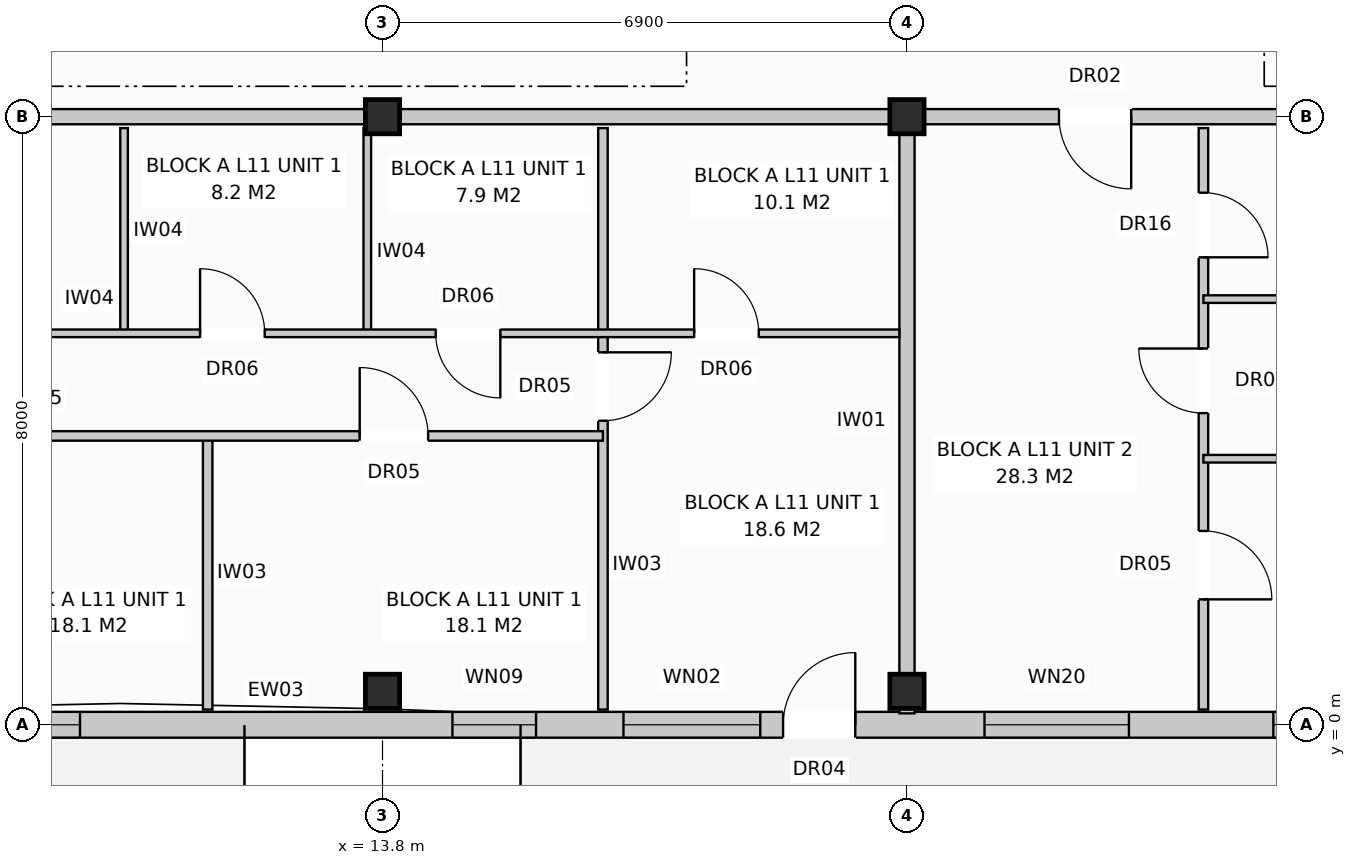
"""IFC4 building model, lengths in metres.
Left out: names, types, materials, properties, quantities, classifications, styles, units other than length and angle.
Written with IfcOpenShell. Run it as: python <this file> out.ifc"""

import sys

from ifc_helpers import new_model, si_unit, direction, frame, frame_2d, origin, origin_with_axes, origin_2d, place, context, subcontext, project, spatial, rectangle, extrude, element, fill, save


model = new_model("IFC4")
c1 = context("Model", 3, precision=1e-05, world=origin(), true_north=direction((0.0, 1.0)))
c2 = subcontext(c1, "Body", "Model", "MODEL_VIEW")
j1 = project(units=[si_unit("LENGTHUNIT", "METRE"), si_unit("PLANEANGLEUNIT", "RADIAN")], contexts=[c1])
p1 = place(None, origin())
s1 = spatial("IfcSite", under=j1, at=p1, CompositionType="ELEMENT")
p2 = place(p1, origin())
s2 = spatial("IfcBuilding", under=s1, at=p2, CompositionType="ELEMENT")
p3 = place(p2, frame((0.0, 0.0, 36.8)))
s3 = spatial("IfcBuildingStorey", under=s2, at=p3, CompositionType="ELEMENT", Elevation=36.8)
for number, where, z_axis, x_axis in (
    (1, (13.8, 0.44, 0.0), (0.0, 0.0, 1.0), (1.0, 0.0, 0.0)),
    (2, (13.8, 8.0, 0.0), (0.0, 0.0, 1.0), (1.0, 0.0, 0.0)),
    (3, (20.7, 0.44, 0.0), (0.0, 0.0, 1.0), (1.0, 0.0, 0.0)),
    (4, (20.7, 8.0, 0.0), (0.0, 0.0, 1.0), (1.0, 0.0, 0.0)),
):
    element("IfcColumn", number, at=place(p3, frame(where, z_axis=z_axis, x_axis=x_axis)), inside=s3, PredefinedType="COLUMN", context=c2, shape_type="SweptSolid", body=[
        extrude(rectangle(XDim=0.45, YDim=0.45, at=origin_2d()), origin(), (0.0, 0.0, 1.0), 3.2),
    ])
p4 = place(p3, frame((0.16, 0.0, 0.0), z_axis=(0.0, 0.0, 1.0), x_axis=(1.0, 0.0, 0.0)))
e5 = element("IfcWall", 5, at=p4, inside=s3, PredefinedType="STANDARD", context=c2, shape_type="SweptSolid", body=[
    extrude(rectangle(XDim=41.08, YDim=0.34, at=frame_2d((20.54, 0.0))), origin(), (0.0, 0.0, 1.0), 2.97),
])
p5 = place(p4, frame((4.926, 0.0, 0.0)))
e6 = element("IfcOpeningElement", 6, at=p5, cuts=e5, PredefinedType="OPENING", context=c2, shape_type="SweptSolid", body=[
    extrude(rectangle(XDim=0.95, YDim=2.1, at=frame_2d((0.475, 1.05))), frame((0.0, 0.182, 0.0), z_axis=(0.0, -1.0, 0.0), x_axis=(1.0, 0.0, 0.0)), (0.0, 0.0, 1.0), 0.364),
])
p6 = place(p4, frame((18.91, 0.0, 0.0)))
e7 = element("IfcOpeningElement", 7, at=p6, cuts=e5, PredefinedType="OPENING", context=c2, shape_type="SweptSolid", body=[
    extrude(rectangle(XDim=0.95, YDim=2.1, at=frame_2d((0.475, 1.05))), frame((0.0, 0.182, 0.0), z_axis=(0.0, -1.0, 0.0), x_axis=(1.0, 0.0, 0.0)), (0.0, 0.0, 1.0), 0.364),
])
p7 = place(p4, frame((30.426, 0.0, 0.0)))
e8 = element("IfcOpeningElement", 8, at=p7, cuts=e5, PredefinedType="OPENING", context=c2, shape_type="SweptSolid", body=[
    extrude(rectangle(XDim=0.95, YDim=2.1, at=frame_2d((0.475, 1.05))), frame((0.0, 0.182, 0.0), z_axis=(0.0, -1.0, 0.0), x_axis=(1.0, 0.0, 0.0)), (0.0, 0.0, 1.0), 0.364),
])
p8 = place(p4, frame((2.46, 0.0, 0.72)))
e9 = element("IfcOpeningElement", 9, at=p8, cuts=e5, PredefinedType="OPENING", context=c2, shape_type="SweptSolid", body=[
    extrude(rectangle(XDim=1.1, YDim=1.5, at=frame_2d((0.55, 0.75))), frame((0.0, 0.182, 0.0), z_axis=(0.0, -1.0, 0.0), x_axis=(1.0, 0.0, 0.0)), (0.0, 0.0, 1.0), 0.364),
])
p9 = place(p4, frame((7.76, 0.0, 0.72)))
e10 = element("IfcOpeningElement", 10, at=p9, cuts=e5, PredefinedType="OPENING", context=c2, shape_type="SweptSolid", body=[
    extrude(rectangle(XDim=1.9, YDim=1.85, at=frame_2d((0.95, 0.925))), frame((0.0, 0.182, 0.0), z_axis=(0.0, -1.0, 0.0), x_axis=(1.0, 0.0, 0.0)), (0.0, 0.0, 1.0), 0.364),
])
p10 = place(p4, frame((14.56, 0.0, 0.72)))
e11 = element("IfcOpeningElement", 11, at=p10, cuts=e5, PredefinedType="OPENING", context=c2, shape_type="SweptSolid", body=[
    extrude(rectangle(XDim=1.1, YDim=1.5, at=frame_2d((0.55, 0.75))), frame((0.0, 0.182, 0.0), z_axis=(0.0, -1.0, 0.0), x_axis=(1.0, 0.0, 0.0)), (0.0, 0.0, 1.0), 0.364),
])
p11 = place(p4, frame((16.81, 0.0, 0.8)))
e12 = element("IfcOpeningElement", 12, at=p11, cuts=e5, PredefinedType="OPENING", context=c2, shape_type="SweptSolid", body=[
    extrude(rectangle(XDim=1.8, YDim=1.7, at=frame_2d((0.9, 0.85))), frame((0.0, 0.182, 0.0), z_axis=(0.0, -1.0, 0.0), x_axis=(1.0, 0.0, 0.0)), (0.0, 0.0, 1.0), 0.364),
])
p12 = place(p4, frame((21.56, 0.0, 0.72)))
e13 = element("IfcOpeningElement", 13, at=p12, cuts=e5, PredefinedType="OPENING", context=c2, shape_type="SweptSolid", body=[
    extrude(rectangle(XDim=1.9, YDim=1.85, at=frame_2d((0.95, 0.925))), frame((0.0, 0.182, 0.0), z_axis=(0.0, -1.0, 0.0), x_axis=(1.0, 0.0, 0.0)), (0.0, 0.0, 1.0), 0.364),
])
p13 = place(p4, frame((25.36, 0.0, 0.72)))
e14 = element("IfcOpeningElement", 14, at=p13, cuts=e5, PredefinedType="OPENING", context=c2, shape_type="SweptSolid", body=[
    extrude(rectangle(XDim=1.1, YDim=1.5, at=frame_2d((0.55, 0.75))), frame((0.0, 0.182, 0.0), z_axis=(0.0, -1.0, 0.0), x_axis=(1.0, 0.0, 0.0)), (0.0, 0.0, 1.0), 0.364),
])
p14 = place(p4, frame((28.66, 0.0, 0.72)))
e15 = element("IfcOpeningElement", 15, at=p14, cuts=e5, PredefinedType="OPENING", context=c2, shape_type="SweptSolid", body=[
    extrude(rectangle(XDim=1.1, YDim=1.5, at=frame_2d((0.55, 0.75))), frame((0.0, 0.182, 0.0), z_axis=(0.0, -1.0, 0.0), x_axis=(1.0, 0.0, 0.0)), (0.0, 0.0, 1.0), 0.364),
])
p15 = place(p4, frame((31.96, 0.0, 0.72)))
e16 = element("IfcOpeningElement", 16, at=p15, cuts=e5, PredefinedType="OPENING", context=c2, shape_type="SweptSolid", body=[
    extrude(rectangle(XDim=1.9, YDim=1.85, at=frame_2d((0.95, 0.925))), frame((0.0, 0.182, 0.0), z_axis=(0.0, -1.0, 0.0), x_axis=(1.0, 0.0, 0.0)), (0.0, 0.0, 1.0), 0.364),
])
p16 = place(p4, frame((38.06, 0.0, 0.72)))
e17 = element("IfcOpeningElement", 17, at=p16, cuts=e5, PredefinedType="OPENING", context=c2, shape_type="SweptSolid", body=[
    extrude(rectangle(XDim=1.1, YDim=1.5, at=frame_2d((0.55, 0.75))), frame((0.0, 0.182, 0.0), z_axis=(0.0, -1.0, 0.0), x_axis=(1.0, 0.0, 0.0)), (0.0, 0.0, 1.0), 0.364),
])
p17 = place(p3, frame((20.7, 7.85, 0.0), z_axis=(0.0, 0.0, 1.0), x_axis=(0.0, -1.0, 0.0)))
e18 = element("IfcWall", 18, at=p17, inside=s3, PredefinedType="PARTITIONING", context=c2, shape_type="SweptSolid", body=[
    extrude(rectangle(XDim=7.7, YDim=0.2, at=frame_2d((3.85, 0.0))), origin(), (0.0, 0.0, 1.0), 2.97),
])
p18 = place(p3, frame((0.0, 8.0, 0.0), z_axis=(0.0, 0.0, 1.0), x_axis=(1.0, 0.0, 0.0)))
e19 = element("IfcWall", 19, at=p18, inside=s3, PredefinedType="PARTITIONING", context=c2, shape_type="SweptSolid", body=[
    extrude(rectangle(XDim=20.7, YDim=0.2, at=frame_2d((10.35, 0.0))), origin(), (0.0, 0.0, 1.0), 2.41),
])
p19 = place(p18, frame((2.4, 0.0, 0.0)))
e20 = element("IfcOpeningElement", 20, at=p19, cuts=e19, PredefinedType="OPENING", context=c2, shape_type="SweptSolid", body=[
    extrude(rectangle(XDim=0.95, YDim=2.15, at=frame_2d((0.475, 1.075))), frame((0.0, 0.112, 0.0), z_axis=(0.0, -1.0, 0.0), x_axis=(1.0, 0.0, 0.0)), (0.0, 0.0, 1.0), 0.224),
])
for number, where, z_axis, x_axis in (
    (21, (10.4, 7.85, 0.0), (0.0, 0.0, 1.0), (0.0, -1.0, 0.0)),
    (22, (13.6, 7.85, 0.0), (0.0, 0.0, 1.0), (0.0, -1.0, 0.0)),
):
    element("IfcWall", number, at=place(p3, frame(where, z_axis=z_axis, x_axis=x_axis)), inside=s3, PredefinedType="PARTITIONING", context=c2, shape_type="SweptSolid", body=[
        extrude(rectangle(XDim=2.7, YDim=0.1, at=frame_2d((1.35, 0.0))), origin(), (0.0, 0.0, 1.0), 2.97),
    ])
p20 = place(p3, frame((11.5, 3.8, 0.0), z_axis=(0.0, 0.0, 1.0), x_axis=(0.0, -1.0, 0.0)))
e23 = element("IfcWall", 23, at=p20, inside=s3, PredefinedType="PARTITIONING", context=c2, shape_type="SweptSolid", body=[
    extrude(rectangle(XDim=3.6, YDim=0.125, at=frame_2d((1.8, 0.0))), origin(), (0.0, 0.0, 1.0), 2.59),
])
p21 = place(p3, frame((16.7, 7.85, 0.0), z_axis=(0.0, 0.0, 1.0), x_axis=(0.0, -1.0, 0.0)))
e24 = element("IfcWall", 24, at=p21, inside=s3, PredefinedType="PARTITIONING", context=c2, shape_type="SweptSolid", body=[
    extrude(rectangle(XDim=7.65, YDim=0.125, at=frame_2d((3.825, 0.0))), origin(), (0.0, 0.0, 1.0), 2.97),
])
p22 = place(p21, frame((2.95, 0.0, 0.0)))
e25 = element("IfcOpeningElement", 25, at=p22, cuts=e24, PredefinedType="OPENING", context=c2, shape_type="SweptSolid", body=[
    extrude(rectangle(XDim=0.9, YDim=2.1, at=frame_2d((0.45, 1.05))), frame((0.0, 0.074, 0.0), z_axis=(0.0, -1.0, 0.0), x_axis=(1.0, 0.0, 0.0)), (0.0, 0.0, 1.0), 0.149),
])
p23 = place(p3, frame((6.3, 5.15, 0.0), z_axis=(0.0, 0.0, 1.0), x_axis=(1.0, 0.0, 0.0)))
e26 = element("IfcWall", 26, at=p23, inside=s3, PredefinedType="PARTITIONING", context=c2, shape_type="SweptSolid", body=[
    extrude(rectangle(XDim=14.3, YDim=0.1, at=frame_2d((7.15, 0.0))), origin(), (0.0, 0.0, 1.0), 2.97),
])
p24 = place(p23, frame((1.6, 0.0, 0.0)))
e27 = element("IfcOpeningElement", 27, at=p24, cuts=e26, PredefinedType="OPENING", context=c2, shape_type="SweptSolid", body=[
    extrude(rectangle(XDim=0.9, YDim=2.1, at=frame_2d((0.45, 1.05))), frame((0.0, 0.062, 0.0), z_axis=(0.0, -1.0, 0.0), x_axis=(1.0, 0.0, 0.0)), (0.0, 0.0, 1.0), 0.124),
])
p25 = place(p23, frame((5.1, 0.0, 0.0)))
e28 = element("IfcOpeningElement", 28, at=p25, cuts=e26, PredefinedType="OPENING", context=c2, shape_type="SweptSolid", body=[
    extrude(rectangle(XDim=0.85, YDim=2.05, at=frame_2d((0.425, 1.025))), frame((0.0, 0.062, 0.0), z_axis=(0.0, -1.0, 0.0), x_axis=(1.0, 0.0, 0.0)), (0.0, 0.0, 1.0), 0.124),
])
p26 = place(p23, frame((8.2, 0.0, 0.0)))
e29 = element("IfcOpeningElement", 29, at=p26, cuts=e26, PredefinedType="OPENING", context=c2, shape_type="SweptSolid", body=[
    extrude(rectangle(XDim=0.85, YDim=2.05, at=frame_2d((0.425, 1.025))), frame((0.0, 0.062, 0.0), z_axis=(0.0, -1.0, 0.0), x_axis=(1.0, 0.0, 0.0)), (0.0, 0.0, 1.0), 0.124),
])
p27 = place(p23, frame((11.6, 0.0, 0.0)))
e30 = element("IfcOpeningElement", 30, at=p27, cuts=e26, PredefinedType="OPENING", context=c2, shape_type="SweptSolid", body=[
    extrude(rectangle(XDim=0.85, YDim=2.05, at=frame_2d((0.425, 1.025))), frame((0.0, 0.062, 0.0), z_axis=(0.0, -1.0, 0.0), x_axis=(1.0, 0.0, 0.0)), (0.0, 0.0, 1.0), 0.124),
])
p28 = place(p3, frame((6.3, 3.8, 0.0), z_axis=(0.0, 0.0, 1.0), x_axis=(1.0, 0.0, 0.0)))
e31 = element("IfcWall", 31, at=p28, inside=s3, PredefinedType="PARTITIONING", context=c2, shape_type="SweptSolid", body=[
    extrude(rectangle(XDim=10.4, YDim=0.125, at=frame_2d((5.2, 0.0))), origin(), (0.0, 0.0, 1.0), 2.97),
])
p29 = place(p28, frame((2.0, 0.0, 0.0)))
e32 = element("IfcOpeningElement", 32, at=p29, cuts=e31, PredefinedType="OPENING", context=c2, shape_type="SweptSolid", body=[
    extrude(rectangle(XDim=0.9, YDim=2.1, at=frame_2d((0.45, 1.05))), frame((0.0, 0.074, 0.0), z_axis=(0.0, -1.0, 0.0), x_axis=(1.0, 0.0, 0.0)), (0.0, 0.0, 1.0), 0.149),
])
p30 = place(p28, frame((7.2, 0.0, 0.0)))
e33 = element("IfcOpeningElement", 33, at=p30, cuts=e31, PredefinedType="OPENING", context=c2, shape_type="SweptSolid", body=[
    extrude(rectangle(XDim=0.9, YDim=2.1, at=frame_2d((0.45, 1.05))), frame((0.0, 0.074, 0.0), z_axis=(0.0, -1.0, 0.0), x_axis=(1.0, 0.0, 0.0)), (0.0, 0.0, 1.0), 0.149),
])
p31 = place(p3, frame((20.7, 8.0, 0.0), z_axis=(0.0, 0.0, 1.0), x_axis=(1.0, 0.0, 0.0)))
e34 = element("IfcWall", 34, at=p31, inside=s3, PredefinedType="PARTITIONING", context=c2, shape_type="SweptSolid", body=[
    extrude(rectangle(XDim=6.9, YDim=0.2, at=frame_2d((3.45, 0.0))), origin(), (0.0, 0.0, 1.0), 2.41),
])
p32 = place(p31, frame((2.0, 0.0, 0.0)))
e35 = element("IfcOpeningElement", 35, at=p32, cuts=e34, PredefinedType="OPENING", context=c2, shape_type="SweptSolid", body=[
    extrude(rectangle(XDim=0.95, YDim=2.15, at=frame_2d((0.475, 1.075))), frame((0.0, 0.112, 0.0), z_axis=(0.0, -1.0, 0.0), x_axis=(1.0, 0.0, 0.0)), (0.0, 0.0, 1.0), 0.224),
])
p33 = place(p3, frame((24.6, 7.85, 0.0), z_axis=(0.0, 0.0, 1.0), x_axis=(0.0, -1.0, 0.0)))
e36 = element("IfcWall", 36, at=p33, inside=s3, PredefinedType="PARTITIONING", context=c2, shape_type="SweptSolid", body=[
    extrude(rectangle(XDim=7.65, YDim=0.125, at=frame_2d((3.825, 0.0))), origin(), (0.0, 0.0, 1.0), 2.97),
])
p34 = place(p33, frame((0.85, 0.0, 0.0)))
e37 = element("IfcOpeningElement", 37, at=p34, cuts=e36, PredefinedType="OPENING", context=c2, shape_type="SweptSolid", body=[
    extrude(rectangle(XDim=0.85, YDim=2.1, at=frame_2d((0.425, 1.05))), frame((0.0, 0.074, 0.0), z_axis=(0.0, -1.0, 0.0), x_axis=(1.0, 0.0, 0.0)), (0.0, 0.0, 1.0), 0.149),
])
p35 = place(p33, frame((2.9, 0.0, 0.0)))
e38 = element("IfcOpeningElement", 38, at=p35, cuts=e36, PredefinedType="OPENING", context=c2, shape_type="SweptSolid", body=[
    extrude(rectangle(XDim=0.85, YDim=2.05, at=frame_2d((0.425, 1.025))), frame((0.0, 0.074, 0.0), z_axis=(0.0, -1.0, 0.0), x_axis=(1.0, 0.0, 0.0)), (0.0, 0.0, 1.0), 0.149),
])
p36 = place(p33, frame((5.3, 0.0, 0.0)))
e39 = element("IfcOpeningElement", 39, at=p36, cuts=e36, PredefinedType="OPENING", context=c2, shape_type="SweptSolid", body=[
    extrude(rectangle(XDim=0.9, YDim=2.1, at=frame_2d((0.45, 1.05))), frame((0.0, 0.074, 0.0), z_axis=(0.0, -1.0, 0.0), x_axis=(1.0, 0.0, 0.0)), (0.0, 0.0, 1.0), 0.149),
])
for number, where, z_axis, x_axis in (
    (40, (24.6, 5.6, 0.0), (0.0, 0.0, 1.0), (1.0, 0.0, 0.0)),
    (41, (24.6, 3.5, 0.0), (0.0, 0.0, 1.0), (1.0, 0.0, 0.0)),
):
    element("IfcWall", number, at=place(p3, frame(where, z_axis=z_axis, x_axis=x_axis)), inside=s3, PredefinedType="PARTITIONING", context=c2, shape_type="SweptSolid", body=[
        extrude(rectangle(XDim=2.9, YDim=0.1, at=frame_2d((1.45, 0.0))), origin(), (0.0, 0.0, 1.0), 2.97),
    ])
p37 = place(p6, origin_with_axes())
e42 = element("IfcDoor", 42, at=p37, inside=s3, OperationType="SINGLE_SWING_RIGHT", PredefinedType="DOOR", context=c2, shape_type="SweptSolid", body=[
    extrude(rectangle(XDim=0.95, YDim=2.1, at=frame_2d((0.475, 1.05))), frame((0.0, 0.025, 0.0), z_axis=(0.0, -1.0, 0.0), x_axis=(1.0, 0.0, 0.0)), (0.0, 0.0, 1.0), 0.05),
])
fill(e7, e42)
p38 = place(p9, origin_with_axes())
e43 = element("IfcWindow", 43, at=p38, inside=s3, PartitioningType="SINGLE_PANEL", PredefinedType="WINDOW", context=c2, shape_type="SweptSolid", body=[
    extrude(rectangle(XDim=1.9, YDim=1.85, at=frame_2d((0.95, 0.925))), frame((0.0, 0.03, 0.0), z_axis=(0.0, -1.0, 0.0), x_axis=(1.0, 0.0, 0.0)), (0.0, 0.0, 1.0), 0.06),
])
fill(e10, e43)
p39 = place(p10, origin_with_axes())
e44 = element("IfcWindow", 44, at=p39, inside=s3, PartitioningType="SINGLE_PANEL", PredefinedType="WINDOW", context=c2, shape_type="SweptSolid", body=[
    extrude(rectangle(XDim=1.1, YDim=1.5, at=frame_2d((0.55, 0.75))), frame((0.0, 0.03, 0.0), z_axis=(0.0, -1.0, 0.0), x_axis=(1.0, 0.0, 0.0)), (0.0, 0.0, 1.0), 0.06),
])
fill(e11, e44)
p40 = place(p11, origin_with_axes())
e45 = element("IfcWindow", 45, at=p40, inside=s3, PartitioningType="SINGLE_PANEL", PredefinedType="WINDOW", context=c2, shape_type="SweptSolid", body=[
    extrude(rectangle(XDim=1.8, YDim=1.7, at=frame_2d((0.9, 0.85))), frame((0.0, 0.03, 0.0), z_axis=(0.0, -1.0, 0.0), x_axis=(1.0, 0.0, 0.0)), (0.0, 0.0, 1.0), 0.06),
])
fill(e12, e45)
p41 = place(p12, origin_with_axes())
e46 = element("IfcWindow", 46, at=p41, inside=s3, PartitioningType="SINGLE_PANEL", PredefinedType="WINDOW", context=c2, shape_type="SweptSolid", body=[
    extrude(rectangle(XDim=1.9, YDim=1.85, at=frame_2d((0.95, 0.925))), frame((0.0, 0.03, 0.0), z_axis=(0.0, -1.0, 0.0), x_axis=(1.0, 0.0, 0.0)), (0.0, 0.0, 1.0), 0.06),
])
fill(e13, e46)
p42 = place(p13, origin_with_axes())
e47 = element("IfcWindow", 47, at=p42, inside=s3, PartitioningType="SINGLE_PANEL", PredefinedType="WINDOW", context=c2, shape_type="SweptSolid", body=[
    extrude(rectangle(XDim=1.1, YDim=1.5, at=frame_2d((0.55, 0.75))), frame((0.0, 0.03, 0.0), z_axis=(0.0, -1.0, 0.0), x_axis=(1.0, 0.0, 0.0)), (0.0, 0.0, 1.0), 0.06),
])
fill(e14, e47)
p43 = place(p22, origin_with_axes())
e48 = element("IfcDoor", 48, at=p43, inside=s3, OperationType="SINGLE_SWING_LEFT", PredefinedType="DOOR", context=c2, shape_type="SweptSolid", body=[
    extrude(rectangle(XDim=0.9, YDim=2.1, at=frame_2d((0.45, 1.05))), frame((0.0, 0.025, 0.0), z_axis=(0.0, -1.0, 0.0), x_axis=(1.0, 0.0, 0.0)), (0.0, 0.0, 1.0), 0.05),
])
fill(e25, e48)
p44 = place(p25, origin_with_axes())
e49 = element("IfcDoor", 49, at=p44, inside=s3, OperationType="SINGLE_SWING_LEFT", PredefinedType="DOOR", context=c2, shape_type="SweptSolid", body=[
    extrude(rectangle(XDim=0.85, YDim=2.05, at=frame_2d((0.425, 1.025))), frame((0.0, 0.025, 0.0), z_axis=(0.0, -1.0, 0.0), x_axis=(1.0, 0.0, 0.0)), (0.0, 0.0, 1.0), 0.05),
])
fill(e28, e49)
p45 = place(p26, frame((0.85, 0.0, 0.0), z_axis=(0.0, 0.0, 1.0), x_axis=(-1.0, 0.0, 0.0)))
e50 = element("IfcDoor", 50, at=p45, inside=s3, OperationType="SINGLE_SWING_RIGHT", PredefinedType="DOOR", context=c2, shape_type="SweptSolid", body=[
    extrude(rectangle(XDim=0.85, YDim=2.05, at=frame_2d((0.425, 1.025))), frame((0.0, 0.025, 0.0), z_axis=(0.0, -1.0, 0.0), x_axis=(1.0, 0.0, 0.0)), (0.0, 0.0, 1.0), 0.05),
])
fill(e29, e50)
p46 = place(p27, origin_with_axes())
e51 = element("IfcDoor", 51, at=p46, inside=s3, OperationType="SINGLE_SWING_LEFT", PredefinedType="DOOR", context=c2, shape_type="SweptSolid", body=[
    extrude(rectangle(XDim=0.85, YDim=2.05, at=frame_2d((0.425, 1.025))), frame((0.0, 0.025, 0.0), z_axis=(0.0, -1.0, 0.0), x_axis=(1.0, 0.0, 0.0)), (0.0, 0.0, 1.0), 0.05),
])
fill(e30, e51)
p47 = place(p30, origin_with_axes())
e52 = element("IfcDoor", 52, at=p47, inside=s3, OperationType="SINGLE_SWING_LEFT", PredefinedType="DOOR", context=c2, shape_type="SweptSolid", body=[
    extrude(rectangle(XDim=0.9, YDim=2.1, at=frame_2d((0.45, 1.05))), frame((0.0, 0.025, 0.0), z_axis=(0.0, -1.0, 0.0), x_axis=(1.0, 0.0, 0.0)), (0.0, 0.0, 1.0), 0.05),
])
fill(e33, e52)
p48 = place(p32, frame((0.95, 0.0, 0.0), z_axis=(0.0, 0.0, 1.0), x_axis=(-1.0, 0.0, 0.0)))
e53 = element("IfcDoor", 53, at=p48, inside=s3, OperationType="SINGLE_SWING_RIGHT", PredefinedType="DOOR", context=c2, shape_type="SweptSolid", body=[
    extrude(rectangle(XDim=0.95, YDim=2.15, at=frame_2d((0.475, 1.075))), frame((0.0, 0.025, 0.0), z_axis=(0.0, -1.0, 0.0), x_axis=(1.0, 0.0, 0.0)), (0.0, 0.0, 1.0), 0.05),
])
fill(e35, e53)
p49 = place(p34, origin_with_axes())
e54 = element("IfcDoor", 54, at=p49, inside=s3, OperationType="SINGLE_SWING_RIGHT", PredefinedType="DOOR", context=c2, shape_type="SweptSolid", body=[
    extrude(rectangle(XDim=0.85, YDim=2.1, at=frame_2d((0.425, 1.05))), frame((0.0, 0.025, 0.0), z_axis=(0.0, -1.0, 0.0), x_axis=(1.0, 0.0, 0.0)), (0.0, 0.0, 1.0), 0.05),
])
fill(e37, e54)
p50 = place(p35, frame((0.85, 0.0, 0.0), z_axis=(0.0, 0.0, 1.0), x_axis=(-1.0, 0.0, 0.0)))
e55 = element("IfcDoor", 55, at=p50, inside=s3, OperationType="SINGLE_SWING_LEFT", PredefinedType="DOOR", context=c2, shape_type="SweptSolid", body=[
    extrude(rectangle(XDim=0.85, YDim=2.05, at=frame_2d((0.425, 1.025))), frame((0.0, 0.025, 0.0), z_axis=(0.0, -1.0, 0.0), x_axis=(1.0, 0.0, 0.0)), (0.0, 0.0, 1.0), 0.05),
])
fill(e38, e55)
p51 = place(p36, origin_with_axes())
e56 = element("IfcDoor", 56, at=p51, inside=s3, OperationType="SINGLE_SWING_RIGHT", PredefinedType="DOOR", context=c2, shape_type="SweptSolid", body=[
    extrude(rectangle(XDim=0.9, YDim=2.1, at=frame_2d((0.45, 1.05))), frame((0.0, 0.025, 0.0), z_axis=(0.0, -1.0, 0.0), x_axis=(1.0, 0.0, 0.0)), (0.0, 0.0, 1.0), 0.05),
])
fill(e39, e56)
save(model, sys.argv[1])
